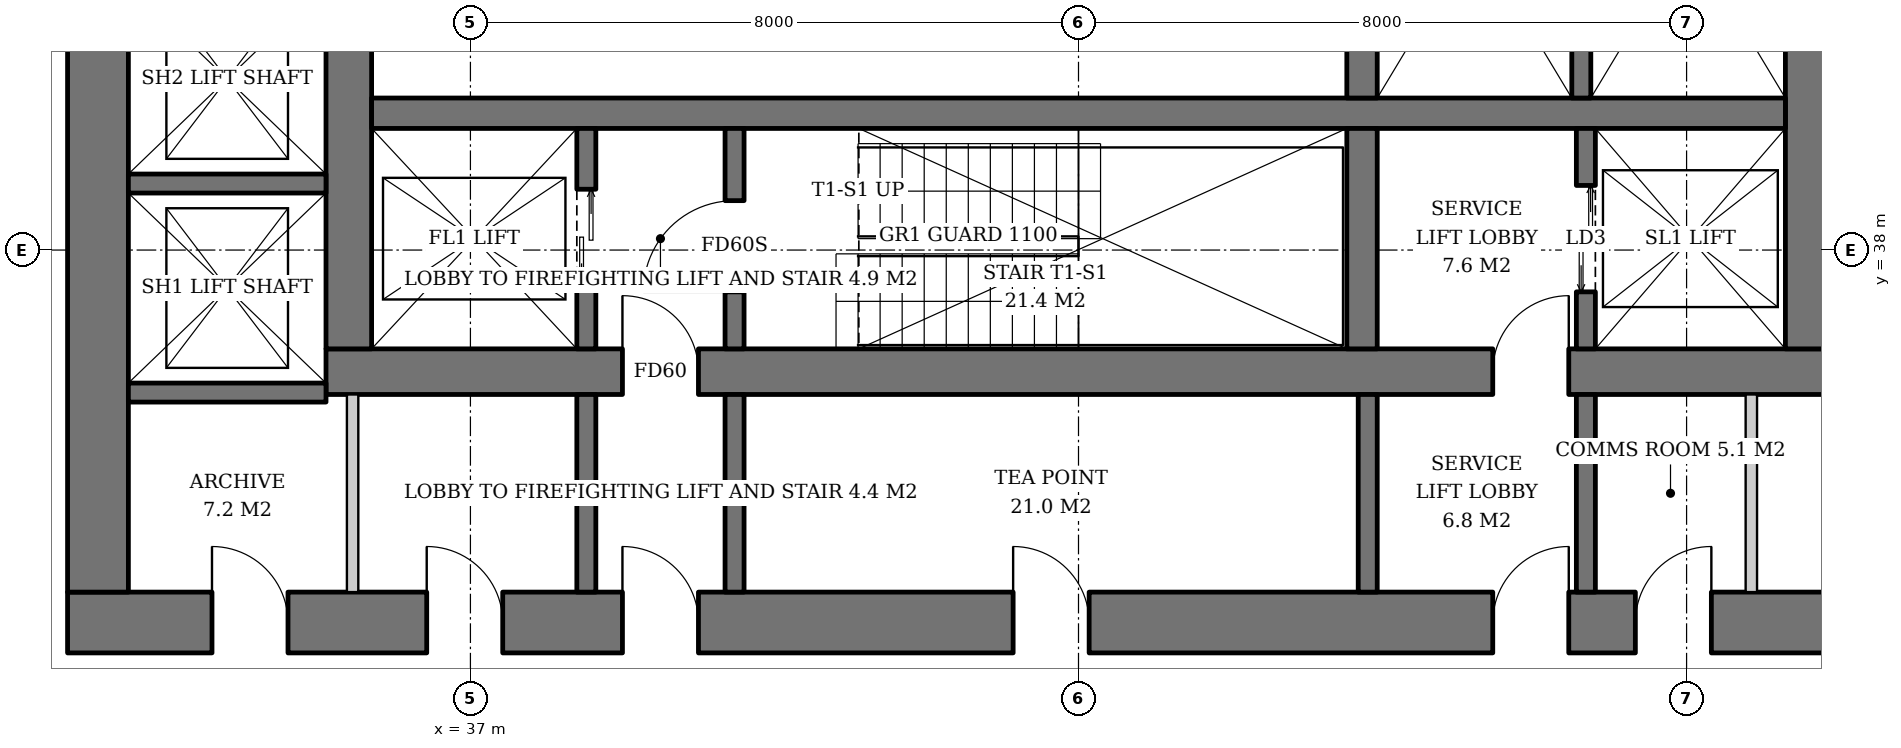
"""IFC4 building model, lengths in metres.
Left out: names, types, materials, properties, quantities, classifications, styles, units other than length and angle.
Written with IfcOpenShell. Run it as: python <this file> out.ifc"""

import sys

from ifc_helpers import new_model, si_unit, direction, frame, frame_2d, origin, place, context, subcontext, project, spatial, rectangle, extrude, element, fill, save


model = new_model("IFC4")
c1 = context("Model", 3, precision=1e-05, world=origin(), true_north=direction((0.0, 1.0)))
c2 = subcontext(c1, "Body", "Model", "MODEL_VIEW")
j1 = project(units=[si_unit("LENGTHUNIT", "METRE"), si_unit("PLANEANGLEUNIT", "RADIAN")], contexts=[c1])
p1 = place(None, origin())
s1 = spatial("IfcSite", under=j1, at=p1, CompositionType="ELEMENT")
p2 = place(p1, origin())
s2 = spatial("IfcBuilding", under=s1, at=p2, CompositionType="ELEMENT")
p3 = place(p2, frame((0.0, 0.0, 78.0)))
s3 = spatial("IfcBuildingStorey", under=s2, at=p3, CompositionType="ELEMENT", Elevation=78.0)
p4 = place(p3, frame((35.1, 36.4, 0.0), z_axis=(0.0, 0.0, 1.0), x_axis=(1.0, 0.0, 0.0)))
e1 = element("IfcWall", 1, at=p4, inside=s3, PredefinedType="SHEAR", context=c2, shape_type="SweptSolid", body=[
    extrude(rectangle(XDim=19.8, YDim=0.6, at=frame_2d((9.9, 0.0))), origin(), (0.0, 0.0, 1.0), 3.8),
])
p5 = place(p4, frame((3.9, 0.0, 0.0)))
e2 = element("IfcOpeningElement", 2, at=p5, cuts=e1, PredefinedType="OPENING", context=c2, shape_type="SweptSolid", body=[
    extrude(rectangle(XDim=1.0, YDim=2.1, at=frame_2d((0.5, 1.05))), frame((0.0, 0.31, 0.0), z_axis=(0.0, -1.0, 0.0), x_axis=(1.0, 0.0, 0.0)), (0.0, 0.0, 1.0), 0.62),
])
p6 = place(p4, frame((15.35, 0.0, 0.0)))
e3 = element("IfcOpeningElement", 3, at=p6, cuts=e1, PredefinedType="OPENING", context=c2, shape_type="SweptSolid", body=[
    extrude(rectangle(XDim=1.0, YDim=2.1, at=frame_2d((0.5, 1.05))), frame((0.0, 0.31, 0.0), z_axis=(0.0, -1.0, 0.0), x_axis=(1.0, 0.0, 0.0)), (0.0, 0.0, 1.0), 0.62),
])
p7 = place(p3, frame((35.4, 36.7, 0.0), z_axis=(0.0, 0.0, 1.0), x_axis=(0.0, 1.0, 0.0)))
e4 = element("IfcWall", 4, at=p7, inside=s3, PredefinedType="SHEAR", context=c2, shape_type="SweptSolid", body=[
    extrude(rectangle(XDim=18.6, YDim=0.6, at=frame_2d((9.3, 0.0))), origin(), (0.0, 0.0, 1.0), 3.8),
])
p8 = place(p7, frame((8.4, 0.0, 0.0)))
e5 = element("IfcOpeningElement", 5, at=p8, cuts=e4, PredefinedType="OPENING", context=c2, shape_type="SweptSolid", body=[
    extrude(rectangle(XDim=1.8, YDim=2.4, at=frame_2d((0.9, 1.2))), frame((0.0, 0.31, 0.0), z_axis=(0.0, -1.0, 0.0), x_axis=(1.0, 0.0, 0.0)), (0.0, 0.0, 1.0), 0.62),
])
p9 = place(p3, frame((54.6, 36.7, 0.0), z_axis=(0.0, 0.0, 1.0), x_axis=(0.0, 1.0, 0.0)))
e6 = element("IfcWall", 6, at=p9, inside=s3, PredefinedType="SHEAR", context=c2, shape_type="SweptSolid", body=[
    extrude(rectangle(XDim=18.6, YDim=0.6, at=frame_2d((9.3, 0.0))), origin(), (0.0, 0.0, 1.0), 3.8),
])
p10 = place(p9, frame((8.4, 0.0, 0.0)))
e7 = element("IfcOpeningElement", 7, at=p10, cuts=e6, PredefinedType="OPENING", context=c2, shape_type="SweptSolid", body=[
    extrude(rectangle(XDim=1.8, YDim=2.4, at=frame_2d((0.9, 1.2))), frame((0.0, 0.31, 0.0), z_axis=(0.0, -1.0, 0.0), x_axis=(1.0, 0.0, 0.0)), (0.0, 0.0, 1.0), 0.62),
])
p11 = place(p3, frame((31.7, 33.1, 0.0), z_axis=(0.0, 0.0, 1.0), x_axis=(1.0, 0.0, 0.0)))
e8 = element("IfcWall", 8, at=p11, inside=s3, PredefinedType="SHEAR", context=c2, shape_type="SweptSolid", body=[
    extrude(rectangle(XDim=26.6, YDim=0.8, at=frame_2d((13.3, 0.0))), origin(), (0.0, 0.0, 1.0), 3.8),
])
p12 = place(p11, frame((7.3, 0.0, 0.0)))
e9 = element("IfcOpeningElement", 9, at=p12, cuts=e8, PredefinedType="OPENING", context=c2, shape_type="SweptSolid", body=[
    extrude(rectangle(XDim=1.0, YDim=2.1, at=frame_2d((0.5, 1.05))), frame((0.0, 0.41, 0.0), z_axis=(0.0, -1.0, 0.0), x_axis=(1.0, 0.0, 0.0)), (0.0, 0.0, 1.0), 0.82),
])
p13 = place(p11, frame((18.75, 0.0, 0.0)))
e10 = element("IfcOpeningElement", 10, at=p13, cuts=e8, PredefinedType="OPENING", context=c2, shape_type="SweptSolid", body=[
    extrude(rectangle(XDim=1.0, YDim=2.1, at=frame_2d((0.5, 1.05))), frame((0.0, 0.41, 0.0), z_axis=(0.0, -1.0, 0.0), x_axis=(1.0, 0.0, 0.0)), (0.0, 0.0, 1.0), 0.82),
])
p14 = place(p11, frame((1.9, 0.0, 0.0)))
e11 = element("IfcOpeningElement", 11, at=p14, cuts=e8, PredefinedType="OPENING", context=c2, shape_type="SweptSolid", body=[
    extrude(rectangle(XDim=1.0, YDim=2.1, at=frame_2d((0.5, 1.05))), frame((0.0, 0.41, 0.0), z_axis=(0.0, -1.0, 0.0), x_axis=(1.0, 0.0, 0.0)), (0.0, 0.0, 1.0), 0.82),
])
p15 = place(p11, frame((4.725, 0.0, 0.0)))
e12 = element("IfcOpeningElement", 12, at=p15, cuts=e8, PredefinedType="OPENING", context=c2, shape_type="SweptSolid", body=[
    extrude(rectangle(XDim=1.0, YDim=2.1, at=frame_2d((0.5, 1.05))), frame((0.0, 0.41, 0.0), z_axis=(0.0, -1.0, 0.0), x_axis=(1.0, 0.0, 0.0)), (0.0, 0.0, 1.0), 0.82),
])
p16 = place(p11, frame((12.44, 0.0, 0.0)))
e13 = element("IfcOpeningElement", 13, at=p16, cuts=e8, PredefinedType="OPENING", context=c2, shape_type="SweptSolid", body=[
    extrude(rectangle(XDim=1.0, YDim=2.1, at=frame_2d((0.5, 1.05))), frame((0.0, 0.41, 0.0), z_axis=(0.0, -1.0, 0.0), x_axis=(1.0, 0.0, 0.0)), (0.0, 0.0, 1.0), 0.82),
])
p17 = place(p11, frame((20.626, 0.0, 0.0)))
e14 = element("IfcOpeningElement", 14, at=p17, cuts=e8, PredefinedType="OPENING", context=c2, shape_type="SweptSolid", body=[
    extrude(rectangle(XDim=1.0, YDim=2.1, at=frame_2d((0.5, 1.05))), frame((0.0, 0.41, 0.0), z_axis=(0.0, -1.0, 0.0), x_axis=(1.0, 0.0, 0.0)), (0.0, 0.0, 1.0), 0.82),
])
p18 = place(p11, frame((23.476, 0.0, 0.0)))
e15 = element("IfcOpeningElement", 15, at=p18, cuts=e8, PredefinedType="OPENING", context=c2, shape_type="SweptSolid", body=[
    extrude(rectangle(XDim=1.0, YDim=2.1, at=frame_2d((0.5, 1.05))), frame((0.0, 0.41, 0.0), z_axis=(0.0, -1.0, 0.0), x_axis=(1.0, 0.0, 0.0)), (0.0, 0.0, 1.0), 0.82),
])
p19 = place(p3, frame((32.1, 33.5, 0.0), z_axis=(0.0, 0.0, 1.0), x_axis=(0.0, 1.0, 0.0)))
e16 = element("IfcWall", 16, at=p19, inside=s3, PredefinedType="SHEAR", context=c2, shape_type="SweptSolid", body=[
    extrude(rectangle(XDim=25.0, YDim=0.8, at=frame_2d((12.5, 0.0))), origin(), (0.0, 0.0, 1.0), 3.8),
])
p20 = place(p19, frame((11.6, 0.0, 0.0)))
e17 = element("IfcOpeningElement", 17, at=p20, cuts=e16, PredefinedType="OPENING", context=c2, shape_type="SweptSolid", body=[
    extrude(rectangle(XDim=1.8, YDim=2.4, at=frame_2d((0.9, 1.2))), frame((0.0, 0.41, 0.0), z_axis=(0.0, -1.0, 0.0), x_axis=(1.0, 0.0, 0.0)), (0.0, 0.0, 1.0), 0.82),
])
p21 = place(p3, frame((35.7, 39.8, 0.0), z_axis=(0.0, 0.0, 1.0), x_axis=(1.0, 0.0, 0.0)))
e18 = element("IfcWall", 18, at=p21, inside=s3, PredefinedType="SHEAR", context=c2, shape_type="SweptSolid", body=[
    extrude(rectangle(XDim=18.6, YDim=0.4, at=frame_2d((9.3, 0.0))), origin(), (0.0, 0.0, 1.0), 3.8),
])
p22 = place(p3, frame((48.73, 36.7, 0.0), z_axis=(0.0, 0.0, 1.0), x_axis=(0.0, 1.0, 0.0)))
e19 = element("IfcWall", 19, at=p22, inside=s3, PredefinedType="SHEAR", context=c2, shape_type="SweptSolid", body=[
    extrude(rectangle(XDim=2.9, YDim=0.4, at=frame_2d((1.45, 0.0))), origin(), (0.0, 0.0, 1.0), 3.8),
])
p23 = place(p3, frame((48.73, 40.0, 0.0), z_axis=(0.0, 0.0, 1.0), x_axis=(0.0, 1.0, 0.0)))
e20 = element("IfcWall", 20, at=p23, inside=s3, PredefinedType="SHEAR", context=c2, shape_type="SweptSolid", body=[
    extrude(rectangle(XDim=12.0, YDim=0.4, at=frame_2d((6.0, 0.0))), origin(), (0.0, 0.0, 1.0), 3.8),
])
p24 = place(p3, frame((38.525, 36.7, 0.0), z_axis=(0.0, 0.0, 1.0), x_axis=(0.0, 1.0, 0.0)))
e21 = element("IfcWall", 21, at=p24, inside=s3, PredefinedType="SHEAR", context=c2, shape_type="SweptSolid", body=[
    extrude(rectangle(XDim=2.9, YDim=0.25, at=frame_2d((1.45, 0.0))), origin(), (0.0, 0.0, 1.0), 3.8),
])
p25 = place(p24, frame((0.8, 0.0, 0.0)))
e22 = element("IfcOpeningElement", 22, at=p25, cuts=e21, PredefinedType="OPENING", context=c2, shape_type="SweptSolid", body=[
    extrude(rectangle(XDim=1.3, YDim=2.2, at=frame_2d((0.65, 1.1))), frame((0.0, 0.135, 0.0), z_axis=(0.0, -1.0, 0.0), x_axis=(1.0, 0.0, 0.0)), (0.0, 0.0, 1.0), 0.27),
])
p26 = place(p3, frame((40.475, 36.7, 0.0), z_axis=(0.0, 0.0, 1.0), x_axis=(0.0, 1.0, 0.0)))
e23 = element("IfcWall", 23, at=p26, inside=s3, PredefinedType="SHEAR", context=c2, shape_type="SweptSolid", body=[
    extrude(rectangle(XDim=2.9, YDim=0.25, at=frame_2d((1.45, 0.0))), origin(), (0.0, 0.0, 1.0), 3.8),
])
p27 = place(p26, frame((0.75, 0.0, 0.0)))
e24 = element("IfcOpeningElement", 24, at=p27, cuts=e23, PredefinedType="OPENING", context=c2, shape_type="SweptSolid", body=[
    extrude(rectangle(XDim=1.2, YDim=2.1, at=frame_2d((0.6, 1.05))), frame((0.0, 0.135, 0.0), z_axis=(0.0, -1.0, 0.0), x_axis=(1.0, 0.0, 0.0)), (0.0, 0.0, 1.0), 0.27),
])
p28 = place(p3, frame((51.675, 36.7, 0.0), z_axis=(0.0, 0.0, 1.0), x_axis=(0.0, 1.0, 0.0)))
e25 = element("IfcWall", 25, at=p28, inside=s3, PredefinedType="SHEAR", context=c2, shape_type="SweptSolid", body=[
    extrude(rectangle(XDim=2.9, YDim=0.25, at=frame_2d((1.45, 0.0))), origin(), (0.0, 0.0, 1.0), 3.8),
])
p29 = place(p28, frame((0.75, 0.0, 0.0)))
e26 = element("IfcOpeningElement", 26, at=p29, cuts=e25, PredefinedType="OPENING", context=c2, shape_type="SweptSolid", body=[
    extrude(rectangle(XDim=1.4, YDim=2.4, at=frame_2d((0.7, 1.2))), frame((0.0, 0.135, 0.0), z_axis=(0.0, -1.0, 0.0), x_axis=(1.0, 0.0, 0.0)), (0.0, 0.0, 1.0), 0.27),
])
p30 = place(p3, frame((51.615, 44.25, 0.0), z_axis=(0.0, 0.0, 1.0), x_axis=(0.0, -1.0, 0.0)))
e27 = element("IfcWall", 27, at=p30, inside=s3, PredefinedType="SHEAR", context=c2, shape_type="SweptSolid", body=[
    extrude(rectangle(XDim=4.25, YDim=0.25, at=frame_2d((2.125, 0.0))), origin(), (0.0, 0.0, 1.0), 3.8),
])
for number, where, z_axis, x_axis in (
    (28, (32.5, 36.125, 0.0), (0.0, 0.0, 1.0), (1.0, 0.0, 0.0)),
    (29, (32.5, 38.875, 0.0), (0.0, 0.0, 1.0), (1.0, 0.0, 0.0)),
):
    element("IfcWall", number, at=place(p3, frame(where, z_axis=z_axis, x_axis=x_axis)), inside=s3, PredefinedType="SHEAR", context=c2, shape_type="SweptSolid", body=[
        extrude(rectangle(XDim=2.6, YDim=0.25, at=frame_2d((1.3, 0.0))), origin(), (0.0, 0.0, 1.0), 3.8),
    ])
for number, where, z_axis, x_axis in (
    (30, (38.525, 33.5, 0.0), (0.0, 0.0, 1.0), (0.0, 1.0, 0.0)),
    (31, (40.475, 33.5, 0.0), (0.0, 0.0, 1.0), (0.0, 1.0, 0.0)),
    (32, (48.805, 33.5, 0.0), (0.0, 0.0, 1.0), (0.0, 1.0, 0.0)),
    (33, (51.675, 33.5, 0.0), (0.0, 0.0, 1.0), (0.0, 1.0, 0.0)),
):
    element("IfcWall", number, at=place(p3, frame(where, z_axis=z_axis, x_axis=x_axis)), inside=s3, PredefinedType="SOLIDWALL", context=c2, shape_type="SweptSolid", body=[
        extrude(rectangle(XDim=2.6, YDim=0.25, at=frame_2d((1.3, 0.0))), origin(), (0.0, 0.0, 1.0), 3.52),
    ])
for number, where, z_axis, x_axis in (
    (34, (35.45, 33.5, 0.0), (0.0, 0.0, 1.0), (0.0, 1.0, 0.0)),
    (35, (53.852, 33.5, 0.0), (0.0, 0.0, 1.0), (0.0, 1.0, 0.0)),
):
    element("IfcWall", number, at=place(p3, frame(where, z_axis=z_axis, x_axis=x_axis)), inside=s3, PredefinedType="SOLIDWALL", context=c2, shape_type="SweptSolid", body=[
        extrude(rectangle(XDim=2.6, YDim=0.15, at=frame_2d((1.3, 0.0))), origin(), (0.0, 0.0, 1.0), 3.52),
    ])
p31 = place(p25, origin())
e36 = element("IfcDoor", 36, at=p31, inside=s3, OperationType="DOUBLE_DOOR_SLIDING", PredefinedType="DOOR", context=c2, shape_type="SweptSolid", body=[
    extrude(rectangle(XDim=1.3, YDim=2.2, at=frame_2d((0.65, 1.1))), frame((0.0, 0.025, 0.0), z_axis=(0.0, -1.0, 0.0), x_axis=(1.0, 0.0, 0.0)), (0.0, 0.0, 1.0), 0.05),
])
fill(e22, e36)
p32 = place(p27, origin())
e37 = element("IfcDoor", 37, at=p32, inside=s3, OperationType="SINGLE_SWING_LEFT", PredefinedType="DOOR", context=c2, shape_type="SweptSolid", body=[
    extrude(rectangle(XDim=1.2, YDim=2.1, at=frame_2d((0.6, 1.05))), frame((0.0, 0.025, 0.0), z_axis=(0.0, -1.0, 0.0), x_axis=(1.0, 0.0, 0.0)), (0.0, 0.0, 1.0), 0.05),
])
fill(e24, e37)
p33 = place(p29, origin())
e38 = element("IfcDoor", 38, at=p33, inside=s3, OperationType="DOUBLE_DOOR_SLIDING", PredefinedType="DOOR", context=c2, shape_type="SweptSolid", body=[
    extrude(rectangle(XDim=1.4, YDim=2.4, at=frame_2d((0.7, 1.2))), frame((0.0, 0.025, 0.0), z_axis=(0.0, -1.0, 0.0), x_axis=(1.0, 0.0, 0.0)), (0.0, 0.0, 1.0), 0.05),
])
fill(e26, e38)
p34 = place(p5, origin())
e39 = element("IfcDoor", 39, at=p34, inside=s3, OperationType="SINGLE_SWING_LEFT", PredefinedType="DOOR", context=c2, shape_type="SweptSolid", body=[
    extrude(rectangle(XDim=1.0, YDim=2.1, at=frame_2d((0.5, 1.05))), frame((0.0, 0.025, 0.0), z_axis=(0.0, -1.0, 0.0), x_axis=(1.0, 0.0, 0.0)), (0.0, 0.0, 1.0), 0.05),
])
fill(e2, e39)
p35 = place(p6, origin())
e40 = element("IfcDoor", 40, at=p35, inside=s3, OperationType="SINGLE_SWING_RIGHT", PredefinedType="DOOR", context=c2, shape_type="SweptSolid", body=[
    extrude(rectangle(XDim=1.0, YDim=2.1, at=frame_2d((0.5, 1.05))), frame((0.0, 0.025, 0.0), z_axis=(0.0, -1.0, 0.0), x_axis=(1.0, 0.0, 0.0)), (0.0, 0.0, 1.0), 0.05),
])
fill(e3, e40)
p36 = place(p12, origin())
e41 = element("IfcDoor", 41, at=p36, inside=s3, OperationType="SINGLE_SWING_LEFT", PredefinedType="DOOR", context=c2, shape_type="SweptSolid", body=[
    extrude(rectangle(XDim=1.0, YDim=2.1, at=frame_2d((0.5, 1.05))), frame((0.0, 0.025, 0.0), z_axis=(0.0, -1.0, 0.0), x_axis=(1.0, 0.0, 0.0)), (0.0, 0.0, 1.0), 0.05),
])
fill(e9, e41)
p37 = place(p13, origin())
e42 = element("IfcDoor", 42, at=p37, inside=s3, OperationType="SINGLE_SWING_RIGHT", PredefinedType="DOOR", context=c2, shape_type="SweptSolid", body=[
    extrude(rectangle(XDim=1.0, YDim=2.1, at=frame_2d((0.5, 1.05))), frame((0.0, 0.025, 0.0), z_axis=(0.0, -1.0, 0.0), x_axis=(1.0, 0.0, 0.0)), (0.0, 0.0, 1.0), 0.05),
])
fill(e10, e42)
p38 = place(p14, origin())
e43 = element("IfcDoor", 43, at=p38, inside=s3, OperationType="SINGLE_SWING_LEFT", PredefinedType="DOOR", context=c2, shape_type="SweptSolid", body=[
    extrude(rectangle(XDim=1.0, YDim=2.1, at=frame_2d((0.5, 1.05))), frame((0.0, 0.39, 0.0), z_axis=(0.0, -1.0, 0.0), x_axis=(1.0, 0.0, 0.0)), (0.0, 0.0, 1.0), 0.05),
])
fill(e11, e43)
p39 = place(p15, origin())
e44 = element("IfcDoor", 44, at=p39, inside=s3, OperationType="SINGLE_SWING_LEFT", PredefinedType="DOOR", context=c2, shape_type="SweptSolid", body=[
    extrude(rectangle(XDim=1.0, YDim=2.1, at=frame_2d((0.5, 1.05))), frame((0.0, 0.39, 0.0), z_axis=(0.0, -1.0, 0.0), x_axis=(1.0, 0.0, 0.0)), (0.0, 0.0, 1.0), 0.05),
])
fill(e12, e44)
p40 = place(p16, origin())
e45 = element("IfcDoor", 45, at=p40, inside=s3, OperationType="SINGLE_SWING_LEFT", PredefinedType="DOOR", context=c2, shape_type="SweptSolid", body=[
    extrude(rectangle(XDim=1.0, YDim=2.1, at=frame_2d((0.5, 1.05))), frame((0.0, 0.39, 0.0), z_axis=(0.0, -1.0, 0.0), x_axis=(1.0, 0.0, 0.0)), (0.0, 0.0, 1.0), 0.05),
])
fill(e13, e45)
p41 = place(p17, origin())
e46 = element("IfcDoor", 46, at=p41, inside=s3, OperationType="SINGLE_SWING_RIGHT", PredefinedType="DOOR", context=c2, shape_type="SweptSolid", body=[
    extrude(rectangle(XDim=1.0, YDim=2.1, at=frame_2d((0.5, 1.05))), frame((0.0, 0.39, 0.0), z_axis=(0.0, -1.0, 0.0), x_axis=(1.0, 0.0, 0.0)), (0.0, 0.0, 1.0), 0.05),
])
fill(e14, e46)
save(model, sys.argv[1])
